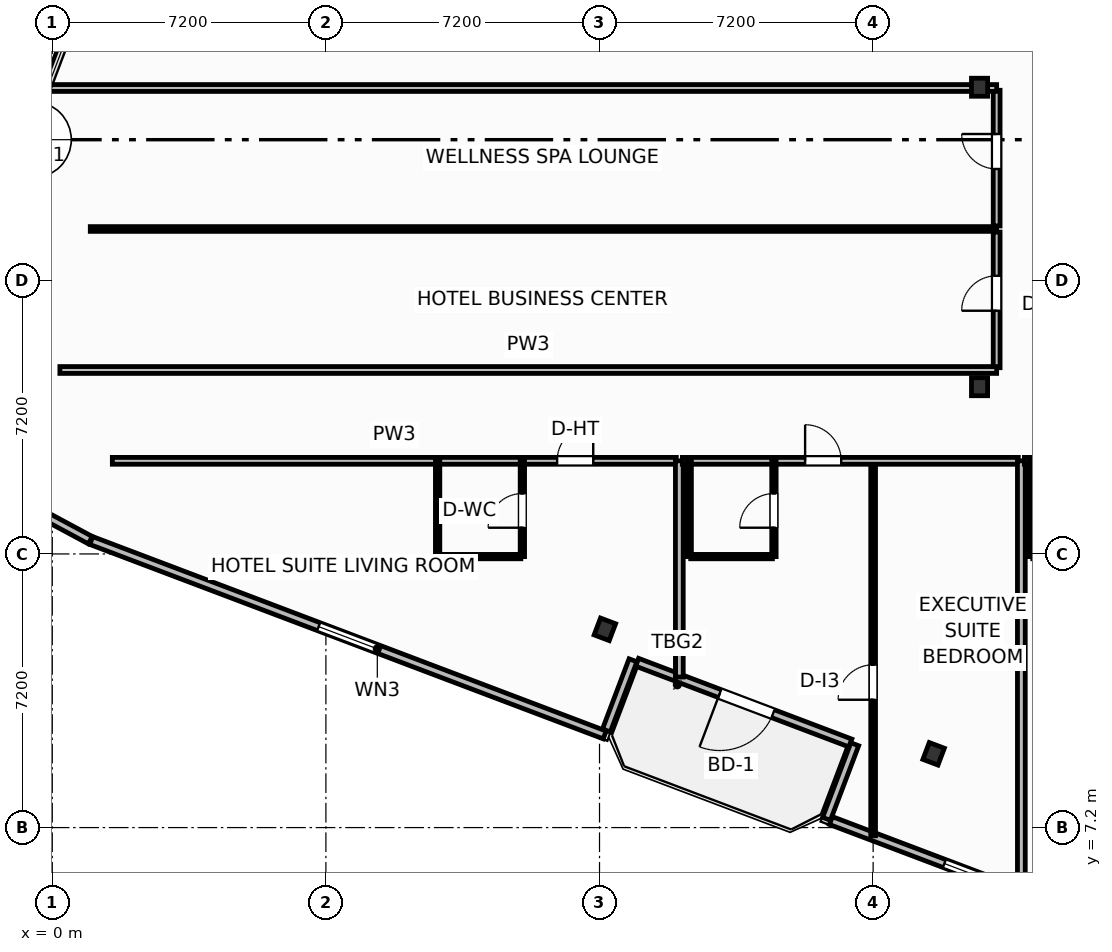
"""IFC4 building model, lengths in metres.
Left out: names, types, materials, properties, quantities, classifications, styles, units other than length and angle.
Written with IfcOpenShell. Run it as: python <this file> out.ifc"""

import sys

from ifc_helpers import new_model, si_unit, direction, frame, frame_2d, origin, origin_2d, place, context, subcontext, project, spatial, rectangle, i_section, extrude, element, fill, save


model = new_model("IFC4")
c1 = context("Model", 3, precision=1e-05, world=origin(), true_north=direction((0.0, 1.0)))
c2 = subcontext(c1, "Body", "Model", "MODEL_VIEW")
j1 = project(units=[si_unit("LENGTHUNIT", "METRE"), si_unit("PLANEANGLEUNIT", "RADIAN")], contexts=[c1])
p1 = place(None, origin())
s1 = spatial("IfcSite", under=j1, at=p1, CompositionType="ELEMENT")
p2 = place(p1, origin())
s2 = spatial("IfcBuilding", under=s1, at=p2, CompositionType="ELEMENT")
p3 = place(p2, frame((0.0, 0.0, 79.9)))
s3 = spatial("IfcBuildingStorey", under=s2, at=p3, CompositionType="ELEMENT", Elevation=79.9)
for number, where, z_axis, x_axis in (
    (1, (24.4, 18.8, 0.0), (0.0, 0.0, 1.0), (1.0, 0.0, 0.0)),
    (2, (24.4, 26.68, 0.0), (0.0, 0.0, 1.0), (1.0, 0.0, 0.0)),
    (3, (14.541, 12.416, 0.0), (0.0, 0.0, 1.0), (0.935, -0.354, 0.0)),
    (4, (23.192, 9.141, 0.0), (0.0, 0.0, 1.0), (0.935, -0.354, 0.0)),
):
    element("IfcColumn", number, at=place(p3, frame(where, z_axis=z_axis, x_axis=x_axis)), inside=s3, PredefinedType="COLUMN", context=c2, shape_type="SweptSolid", body=[
        extrude(i_section(OverallWidth=0.424, OverallDepth=0.474, WebThickness=0.048, FlangeThickness=0.077, FilletRadius=0.025, at=origin_2d()), origin(), (0.0, 0.0, 1.0), 3.7),
    ])
p4 = place(p3, frame((21.0, 9.425, 0.0), z_axis=(0.0, 0.0, 1.0), x_axis=(-0.93521416643, 0.354082565101, 0.0)))
e5 = element("IfcWall", 5, at=p4, inside=s3, PredefinedType="SOLIDWALL", context=c2, shape_type="SweptSolid", body=[
    extrude(rectangle(XDim=6.0, YDim=0.22, at=frame_2d((3.0, 0.0))), origin(), (0.0, 0.0, 1.0), 2.73),
])
p5 = place(p4, frame((2.176, 0.0, 0.0)))
e6 = element("IfcOpeningElement", 6, at=p5, cuts=e5, PredefinedType="OPENING", context=c2, shape_type="SweptSolid", body=[
    extrude(rectangle(XDim=1.5, YDim=2.25, at=frame_2d((0.75, 1.125))), frame((0.0, 0.12, 0.0), z_axis=(0.0, -1.0, 0.0), x_axis=(1.0, 0.0, 0.0)), (0.0, 0.0, 1.0), 0.24),
])
p6 = place(p3, frame((-0.197, 15.406, 0.0), z_axis=(0.0, 0.0, 1.0), x_axis=(0.881023507585, -0.47307248819, 0.0)))
e7 = element("IfcWall", 7, at=p6, inside=s3, PredefinedType="SOLIDWALL", context=c2, shape_type="SweptSolid", body=[
    extrude(rectangle(XDim=1.361, YDim=0.22, at=frame_2d((0.68, 0.0))), origin(), (0.0, 0.0, 1.0), 2.73),
])
p7 = place(p3, frame((1.026, 14.753, 0.0), z_axis=(0.0, 0.0, 1.0), x_axis=(0.935222448475, -0.354060689526, 0.0)))
e8 = element("IfcWall", 8, at=p7, inside=s3, PredefinedType="SOLIDWALL", context=c2, shape_type="SweptSolid", body=[
    extrude(rectangle(XDim=14.447, YDim=0.22, at=frame_2d((7.224, 0.0))), origin(), (0.0, 0.0, 1.0), 2.73),
])
p8 = place(p7, frame((6.399, 0.0, 0.8)))
e9 = element("IfcOpeningElement", 9, at=p8, cuts=e8, PredefinedType="OPENING", context=c2, shape_type="SweptSolid", body=[
    extrude(rectangle(XDim=1.65, YDim=1.65, at=frame_2d((0.825, 0.825))), frame((0.0, 0.12, 0.0), z_axis=(0.0, -1.0, 0.0), x_axis=(1.0, 0.0, 0.0)), (0.0, 0.0, 1.0), 0.24),
])
p9 = place(p3, frame((14.581, 9.755, 0.0), z_axis=(0.0, 0.0, 1.0), x_axis=(0.354061611705, 0.935222099352, 0.0)))
e10 = element("IfcWall", 10, at=p9, inside=s3, PredefinedType="SOLIDWALL", context=c2, shape_type="SweptSolid", body=[
    extrude(rectangle(XDim=1.975, YDim=0.22, at=frame_2d((0.987, 0.0))), origin(), (0.0, 0.0, 1.0), 2.73),
])
p10 = place(p3, frame((21.116, 9.392, 0.0), z_axis=(0.0, 0.0, 1.0), x_axis=(-0.353988291547, -0.935249854022, 0.0)))
e11 = element("IfcWall", 11, at=p10, inside=s3, PredefinedType="SOLIDWALL", context=c2, shape_type="SweptSolid", body=[
    extrude(rectangle(XDim=2.1, YDim=0.22, at=frame_2d((1.05, 0.0))), origin(), (0.0, 0.0, 1.0), 2.73),
])
p11 = place(p3, frame((20.49, 7.384, 0.0), z_axis=(0.0, 0.0, 1.0), x_axis=(0.935230796934, -0.354038636968, 0.0)))
e12 = element("IfcWall", 12, at=p11, inside=s3, PredefinedType="SOLIDWALL", context=c2, shape_type="SweptSolid", body=[
    extrude(rectangle(XDim=8.035, YDim=0.22, at=frame_2d((4.018, 0.0))), origin(), (0.0, 0.0, 1.0), 2.73),
])
p12 = place(p11, frame((3.192, 0.0, 0.8)))
e13 = element("IfcOpeningElement", 13, at=p12, cuts=e12, PredefinedType="OPENING", context=c2, shape_type="SweptSolid", body=[
    extrude(rectangle(XDim=1.65, YDim=1.65, at=frame_2d((0.825, 0.825))), frame((0.0, 0.12, 0.0), z_axis=(0.0, -1.0, 0.0), x_axis=(1.0, 0.0, 0.0)), (0.0, 0.0, 1.0), 0.24),
])
p13 = place(p3, frame((1.58, 16.85, 0.0), z_axis=(0.0, 0.0, 1.0), x_axis=(1.0, 0.0, 0.0)))
e14 = element("IfcWall", 14, at=p13, inside=s3, PredefinedType="PARTITIONING", context=c2, shape_type="SweptSolid", body=[
    extrude(rectangle(XDim=14.84, YDim=0.18, at=frame_2d((7.42, 0.0))), origin(), (0.0, 0.0, 1.0), 3.45),
])
p14 = place(p13, frame((11.705, 0.0, 0.0)))
e15 = element("IfcOpeningElement", 15, at=p14, cuts=e14, PredefinedType="OPENING", context=c2, shape_type="SweptSolid", body=[
    extrude(rectangle(XDim=0.95, YDim=2.15, at=frame_2d((0.475, 1.075))), frame((0.0, 0.1, 0.0), z_axis=(0.0, -1.0, 0.0), x_axis=(1.0, 0.0, 0.0)), (0.0, 0.0, 1.0), 0.2),
])
p15 = place(p3, frame((10.18, 14.33, 0.0), z_axis=(0.0, 0.0, 1.0), x_axis=(1.0, 0.0, 0.0)))
e16 = element("IfcWall", 16, at=p15, inside=s3, PredefinedType="PARTITIONING", context=c2, shape_type="SweptSolid", body=[
    extrude(rectangle(XDim=2.15, YDim=0.115, at=frame_2d((1.075, 0.0))), origin(), (0.0, 0.0, 1.0), 3.45),
])
p16 = place(p3, frame((12.37, 14.33, 0.0), z_axis=(0.0, 0.0, 1.0), x_axis=(0.0, 1.0, 0.0)))
e17 = element("IfcWall", 17, at=p16, inside=s3, PredefinedType="PARTITIONING", context=c2, shape_type="SweptSolid", body=[
    extrude(rectangle(XDim=2.52, YDim=0.115, at=frame_2d((1.26, 0.0))), origin(), (0.0, 0.0, 1.0), 3.45),
])
p17 = place(p16, frame((0.76, 0.0, 0.0)))
e18 = element("IfcOpeningElement", 18, at=p17, cuts=e17, PredefinedType="OPENING", context=c2, shape_type="SweptSolid", body=[
    extrude(rectangle(XDim=0.9, YDim=2.05, at=frame_2d((0.45, 1.025))), frame((0.0, 0.067, 0.0), z_axis=(0.0, -1.0, 0.0), x_axis=(1.0, 0.0, 0.0)), (0.0, 0.0, 1.0), 0.135),
])
p18 = place(p3, frame((10.14, 14.33, 0.0), z_axis=(0.0, 0.0, 1.0), x_axis=(0.0, 1.0, 0.0)))
e19 = element("IfcWall", 19, at=p18, inside=s3, PredefinedType="PARTITIONING", context=c2, shape_type="SweptSolid", body=[
    extrude(rectangle(XDim=2.52, YDim=0.115, at=frame_2d((1.26, 0.0))), origin(), (0.0, 0.0, 1.0), 3.45),
])
p19 = place(p3, frame((16.5, 11.161, 0.0), z_axis=(0.0, 0.0, 1.0), x_axis=(0.0, 1.0, 0.0)))
e20 = element("IfcWall", 20, at=p19, inside=s3, PredefinedType="PARTITIONING", context=c2, shape_type="SweptSolid", body=[
    extrude(rectangle(XDim=5.689, YDim=0.205, at=frame_2d((2.844, 0.0))), origin(), (0.0, 0.0, 1.0), 3.45),
])
p20 = place(p3, frame((21.6, 6.985, 0.0), z_axis=(0.0, 0.0, 1.0), x_axis=(0.0, 1.0, 0.0)))
e21 = element("IfcWall", 21, at=p20, inside=s3, PredefinedType="PARTITIONING", context=c2, shape_type="SweptSolid", body=[
    extrude(rectangle(XDim=9.865, YDim=0.125, at=frame_2d((4.933, 0.0))), origin(), (0.0, 0.0, 1.0), 3.45),
])
p21 = place(p20, frame((3.578, 0.0, 0.0)))
e22 = element("IfcOpeningElement", 22, at=p21, cuts=e21, PredefinedType="OPENING", context=c2, shape_type="SweptSolid", body=[
    extrude(rectangle(XDim=0.92, YDim=2.05, at=frame_2d((0.46, 1.025))), frame((0.0, 0.073, 0.0), z_axis=(0.0, -1.0, 0.0), x_axis=(1.0, 0.0, 0.0)), (0.0, 0.0, 1.0), 0.145),
])
p22 = place(p3, frame((16.58, 16.85, 0.0), z_axis=(0.0, 0.0, 1.0), x_axis=(1.0, 0.0, 0.0)))
e23 = element("IfcWall", 23, at=p22, inside=s3, PredefinedType="PARTITIONING", context=c2, shape_type="SweptSolid", body=[
    extrude(rectangle(XDim=8.84, YDim=0.18, at=frame_2d((4.42, 0.0))), origin(), (0.0, 0.0, 1.0), 3.45),
])
p23 = place(p22, frame((3.23, 0.0, 0.0)))
e24 = element("IfcOpeningElement", 24, at=p23, cuts=e23, PredefinedType="OPENING", context=c2, shape_type="SweptSolid", body=[
    extrude(rectangle(XDim=0.95, YDim=2.15, at=frame_2d((0.475, 1.075))), frame((0.0, 0.1, 0.0), z_axis=(0.0, -1.0, 0.0), x_axis=(1.0, 0.0, 0.0)), (0.0, 0.0, 1.0), 0.2),
])
p24 = place(p3, frame((16.8, 14.33, 0.0), z_axis=(0.0, 0.0, 1.0), x_axis=(1.0, 0.0, 0.0)))
e25 = element("IfcWall", 25, at=p24, inside=s3, PredefinedType="PARTITIONING", context=c2, shape_type="SweptSolid", body=[
    extrude(rectangle(XDim=2.15, YDim=0.115, at=frame_2d((1.075, 0.0))), origin(), (0.0, 0.0, 1.0), 3.45),
])
p25 = place(p3, frame((18.99, 14.33, 0.0), z_axis=(0.0, 0.0, 1.0), x_axis=(0.0, 1.0, 0.0)))
e26 = element("IfcWall", 26, at=p25, inside=s3, PredefinedType="PARTITIONING", context=c2, shape_type="SweptSolid", body=[
    extrude(rectangle(XDim=2.52, YDim=0.115, at=frame_2d((1.26, 0.0))), origin(), (0.0, 0.0, 1.0), 3.45),
])
p26 = place(p25, frame((0.76, 0.0, 0.0)))
e27 = element("IfcOpeningElement", 27, at=p26, cuts=e26, PredefinedType="OPENING", context=c2, shape_type="SweptSolid", body=[
    extrude(rectangle(XDim=0.9, YDim=2.05, at=frame_2d((0.45, 1.025))), frame((0.0, 0.067, 0.0), z_axis=(0.0, -1.0, 0.0), x_axis=(1.0, 0.0, 0.0)), (0.0, 0.0, 1.0), 0.135),
])
p27 = place(p3, frame((16.76, 14.33, 0.0), z_axis=(0.0, 0.0, 1.0), x_axis=(0.0, 1.0, 0.0)))
e28 = element("IfcWall", 28, at=p27, inside=s3, PredefinedType="PARTITIONING", context=c2, shape_type="SweptSolid", body=[
    extrude(rectangle(XDim=2.52, YDim=0.115, at=frame_2d((1.26, 0.0))), origin(), (0.0, 0.0, 1.0), 3.45),
])
p28 = place(p3, frame((25.5, 5.509, 0.0), z_axis=(0.0, 0.0, 1.0), x_axis=(0.0, 1.0, 0.0)))
e29 = element("IfcWall", 29, at=p28, inside=s3, PredefinedType="PARTITIONING", context=c2, shape_type="SweptSolid", body=[
    extrude(rectangle(XDim=11.342, YDim=0.205, at=frame_2d((5.671, 0.0))), origin(), (0.0, 0.0, 1.0), 3.45),
])
p29 = place(p3, frame((25.58, 16.85, 0.0), z_axis=(0.0, 0.0, 1.0), x_axis=(1.0, 0.0, 0.0)))
e30 = element("IfcWall", 30, at=p29, inside=s3, PredefinedType="PARTITIONING", context=c2, shape_type="SweptSolid", body=[
    extrude(rectangle(XDim=8.84, YDim=0.18, at=frame_2d((4.42, 0.0))), origin(), (0.0, 0.0, 1.0), 3.45),
])
p30 = place(p29, frame((3.23, 0.0, 0.0)))
e31 = element("IfcOpeningElement", 31, at=p30, cuts=e30, PredefinedType="OPENING", context=c2, shape_type="SweptSolid", body=[
    extrude(rectangle(XDim=0.95, YDim=2.15, at=frame_2d((0.475, 1.075))), frame((0.0, 0.1, 0.0), z_axis=(0.0, -1.0, 0.0), x_axis=(1.0, 0.0, 0.0)), (0.0, 0.0, 1.0), 0.2),
])
p31 = place(p3, frame((25.76, 14.33, 0.0), z_axis=(0.0, 0.0, 1.0), x_axis=(0.0, 1.0, 0.0)))
e32 = element("IfcWall", 32, at=p31, inside=s3, PredefinedType="PARTITIONING", context=c2, shape_type="SweptSolid", body=[
    extrude(rectangle(XDim=2.52, YDim=0.115, at=frame_2d((1.26, 0.0))), origin(), (0.0, 0.0, 1.0), 3.45),
])
p32 = place(p3, frame((24.85, 19.3, 0.0), z_axis=(0.0, 0.0, 1.0), x_axis=(0.0, 1.0, 0.0)))
e33 = element("IfcWall", 33, at=p32, inside=s3, PredefinedType="PARTITIONING", context=c2, shape_type="SweptSolid", body=[
    extrude(rectangle(XDim=3.57, YDim=0.18, at=frame_2d((1.785, 0.0))), origin(), (0.0, 0.0, 1.0), 3.45),
])
p33 = place(p32, frame((1.5, 0.0, 0.0)))
e34 = element("IfcOpeningElement", 34, at=p33, cuts=e33, PredefinedType="OPENING", context=c2, shape_type="SweptSolid", body=[
    extrude(rectangle(XDim=0.92, YDim=2.05, at=frame_2d((0.46, 1.025))), frame((0.0, 0.1, 0.0), z_axis=(0.0, -1.0, 0.0), x_axis=(1.0, 0.0, 0.0)), (0.0, 0.0, 1.0), 0.2),
])
p34 = place(p3, frame((24.85, 23.03, 0.0), z_axis=(0.0, 0.0, 1.0), x_axis=(0.0, 1.0, 0.0)))
e35 = element("IfcWall", 35, at=p34, inside=s3, PredefinedType="PARTITIONING", context=c2, shape_type="SweptSolid", body=[
    extrude(rectangle(XDim=3.57, YDim=0.18, at=frame_2d((1.785, 0.0))), origin(), (0.0, 0.0, 1.0), 3.45),
])
p35 = place(p34, frame((1.5, 0.0, 0.0)))
e36 = element("IfcOpeningElement", 36, at=p35, cuts=e35, PredefinedType="OPENING", context=c2, shape_type="SweptSolid", body=[
    extrude(rectangle(XDim=0.92, YDim=2.05, at=frame_2d((0.46, 1.025))), frame((0.0, 0.1, 0.0), z_axis=(0.0, -1.0, 0.0), x_axis=(1.0, 0.0, 0.0)), (0.0, 0.0, 1.0), 0.2),
])
p36 = place(p3, frame((1.0, 22.95, 0.0), z_axis=(0.0, 0.0, 1.0), x_axis=(1.0, 0.0, 0.0)))
e37 = element("IfcWall", 37, at=p36, inside=s3, PredefinedType="PARTITIONING", context=c2, shape_type="SweptSolid", body=[
    extrude(rectangle(XDim=23.85, YDim=0.125, at=frame_2d((11.925, 0.0))), origin(), (0.0, 0.0, 1.0), 3.45),
])
p37 = place(p3, frame((0.2, 19.24, 0.0), z_axis=(0.0, 0.0, 1.0), x_axis=(1.0, 0.0, 0.0)))
e38 = element("IfcWall", 38, at=p37, inside=s3, PredefinedType="PARTITIONING", context=c2, shape_type="SweptSolid", body=[
    extrude(rectangle(XDim=24.65, YDim=0.18, at=frame_2d((12.325, 0.0))), origin(), (0.0, 0.0, 1.0), 3.45),
])
p38 = place(p3, frame((-0.086, 26.66, 0.0), z_axis=(0.0, 0.0, 1.0), x_axis=(1.0, 0.0, 0.0)))
e39 = element("IfcWall", 39, at=p38, inside=s3, PredefinedType="PARTITIONING", context=c2, shape_type="SweptSolid", body=[
    extrude(rectangle(XDim=24.936, YDim=0.18, at=frame_2d((12.468, 0.0))), origin(), (0.0, 0.0, 1.0), 2.662),
])
p39 = place(p5, origin())
e40 = element("IfcDoor", 40, at=p39, inside=s3, OperationType="SINGLE_SWING_RIGHT", PredefinedType="DOOR", context=c2, shape_type="SweptSolid", body=[
    extrude(rectangle(XDim=1.5, YDim=2.25, at=frame_2d((0.75, 1.125))), frame((0.0, 0.025, 0.0), z_axis=(0.0, -1.0, 0.0), x_axis=(1.0, 0.0, 0.0)), (0.0, 0.0, 1.0), 0.05),
])
fill(e6, e40)
p40 = place(p8, origin())
e41 = element("IfcWindow", 41, at=p40, inside=s3, PartitioningType="SINGLE_PANEL", PredefinedType="WINDOW", context=c2, shape_type="SweptSolid", body=[
    extrude(rectangle(XDim=1.65, YDim=1.65, at=frame_2d((0.825, 0.825))), frame((0.0, 0.03, 0.0), z_axis=(0.0, -1.0, 0.0), x_axis=(1.0, 0.0, 0.0)), (0.0, 0.0, 1.0), 0.06),
])
fill(e9, e41)
p41 = place(p12, origin())
e42 = element("IfcWindow", 42, at=p41, inside=s3, PartitioningType="SINGLE_PANEL", PredefinedType="WINDOW", context=c2, shape_type="SweptSolid", body=[
    extrude(rectangle(XDim=1.65, YDim=1.65, at=frame_2d((0.825, 0.825))), frame((0.0, 0.03, 0.0), z_axis=(0.0, -1.0, 0.0), x_axis=(1.0, 0.0, 0.0)), (0.0, 0.0, 1.0), 0.06),
])
fill(e13, e42)
p42 = place(p14, origin())
e43 = element("IfcDoor", 43, at=p42, inside=s3, OperationType="SINGLE_SWING_RIGHT", PredefinedType="DOOR", context=c2, shape_type="SweptSolid", body=[
    extrude(rectangle(XDim=0.95, YDim=2.15, at=frame_2d((0.475, 1.075))), frame((0.0, 0.025, 0.0), z_axis=(0.0, -1.0, 0.0), x_axis=(1.0, 0.0, 0.0)), (0.0, 0.0, 1.0), 0.05),
])
fill(e15, e43)
p43 = place(p17, origin())
e44 = element("IfcDoor", 44, at=p43, inside=s3, OperationType="SINGLE_SWING_LEFT", PredefinedType="DOOR", context=c2, shape_type="SweptSolid", body=[
    extrude(rectangle(XDim=0.9, YDim=2.05, at=frame_2d((0.45, 1.025))), frame((0.0, 0.025, 0.0), z_axis=(0.0, -1.0, 0.0), x_axis=(1.0, 0.0, 0.0)), (0.0, 0.0, 1.0), 0.05),
])
fill(e18, e44)
p44 = place(p21, origin())
e45 = element("IfcDoor", 45, at=p44, inside=s3, OperationType="SINGLE_SWING_LEFT", PredefinedType="DOOR", context=c2, shape_type="SweptSolid", body=[
    extrude(rectangle(XDim=0.92, YDim=2.05, at=frame_2d((0.46, 1.025))), frame((0.0, 0.025, 0.0), z_axis=(0.0, -1.0, 0.0), x_axis=(1.0, 0.0, 0.0)), (0.0, 0.0, 1.0), 0.05),
])
fill(e22, e45)
p45 = place(p23, origin())
e46 = element("IfcDoor", 46, at=p45, inside=s3, OperationType="SINGLE_SWING_LEFT", PredefinedType="DOOR", context=c2, shape_type="SweptSolid", body=[
    extrude(rectangle(XDim=0.95, YDim=2.15, at=frame_2d((0.475, 1.075))), frame((0.0, 0.025, 0.0), z_axis=(0.0, -1.0, 0.0), x_axis=(1.0, 0.0, 0.0)), (0.0, 0.0, 1.0), 0.05),
])
fill(e24, e46)
p46 = place(p26, origin())
e47 = element("IfcDoor", 47, at=p46, inside=s3, OperationType="SINGLE_SWING_LEFT", PredefinedType="DOOR", context=c2, shape_type="SweptSolid", body=[
    extrude(rectangle(XDim=0.9, YDim=2.05, at=frame_2d((0.45, 1.025))), frame((0.0, 0.025, 0.0), z_axis=(0.0, -1.0, 0.0), x_axis=(1.0, 0.0, 0.0)), (0.0, 0.0, 1.0), 0.05),
])
fill(e27, e47)
p47 = place(p33, origin())
e48 = element("IfcDoor", 48, at=p47, inside=s3, OperationType="SINGLE_SWING_LEFT", PredefinedType="DOOR", context=c2, shape_type="SweptSolid", body=[
    extrude(rectangle(XDim=0.92, YDim=2.05, at=frame_2d((0.46, 1.025))), frame((0.0, 0.025, 0.0), z_axis=(0.0, -1.0, 0.0), x_axis=(1.0, 0.0, 0.0)), (0.0, 0.0, 1.0), 0.05),
])
fill(e34, e48)
p48 = place(p35, origin())
e49 = element("IfcDoor", 49, at=p48, inside=s3, OperationType="SINGLE_SWING_RIGHT", PredefinedType="DOOR", context=c2, shape_type="SweptSolid", body=[
    extrude(rectangle(XDim=0.92, YDim=2.05, at=frame_2d((0.46, 1.025))), frame((0.0, 0.025, 0.0), z_axis=(0.0, -1.0, 0.0), x_axis=(1.0, 0.0, 0.0)), (0.0, 0.0, 1.0), 0.05),
])
fill(e36, e49)
save(model, sys.argv[1])
